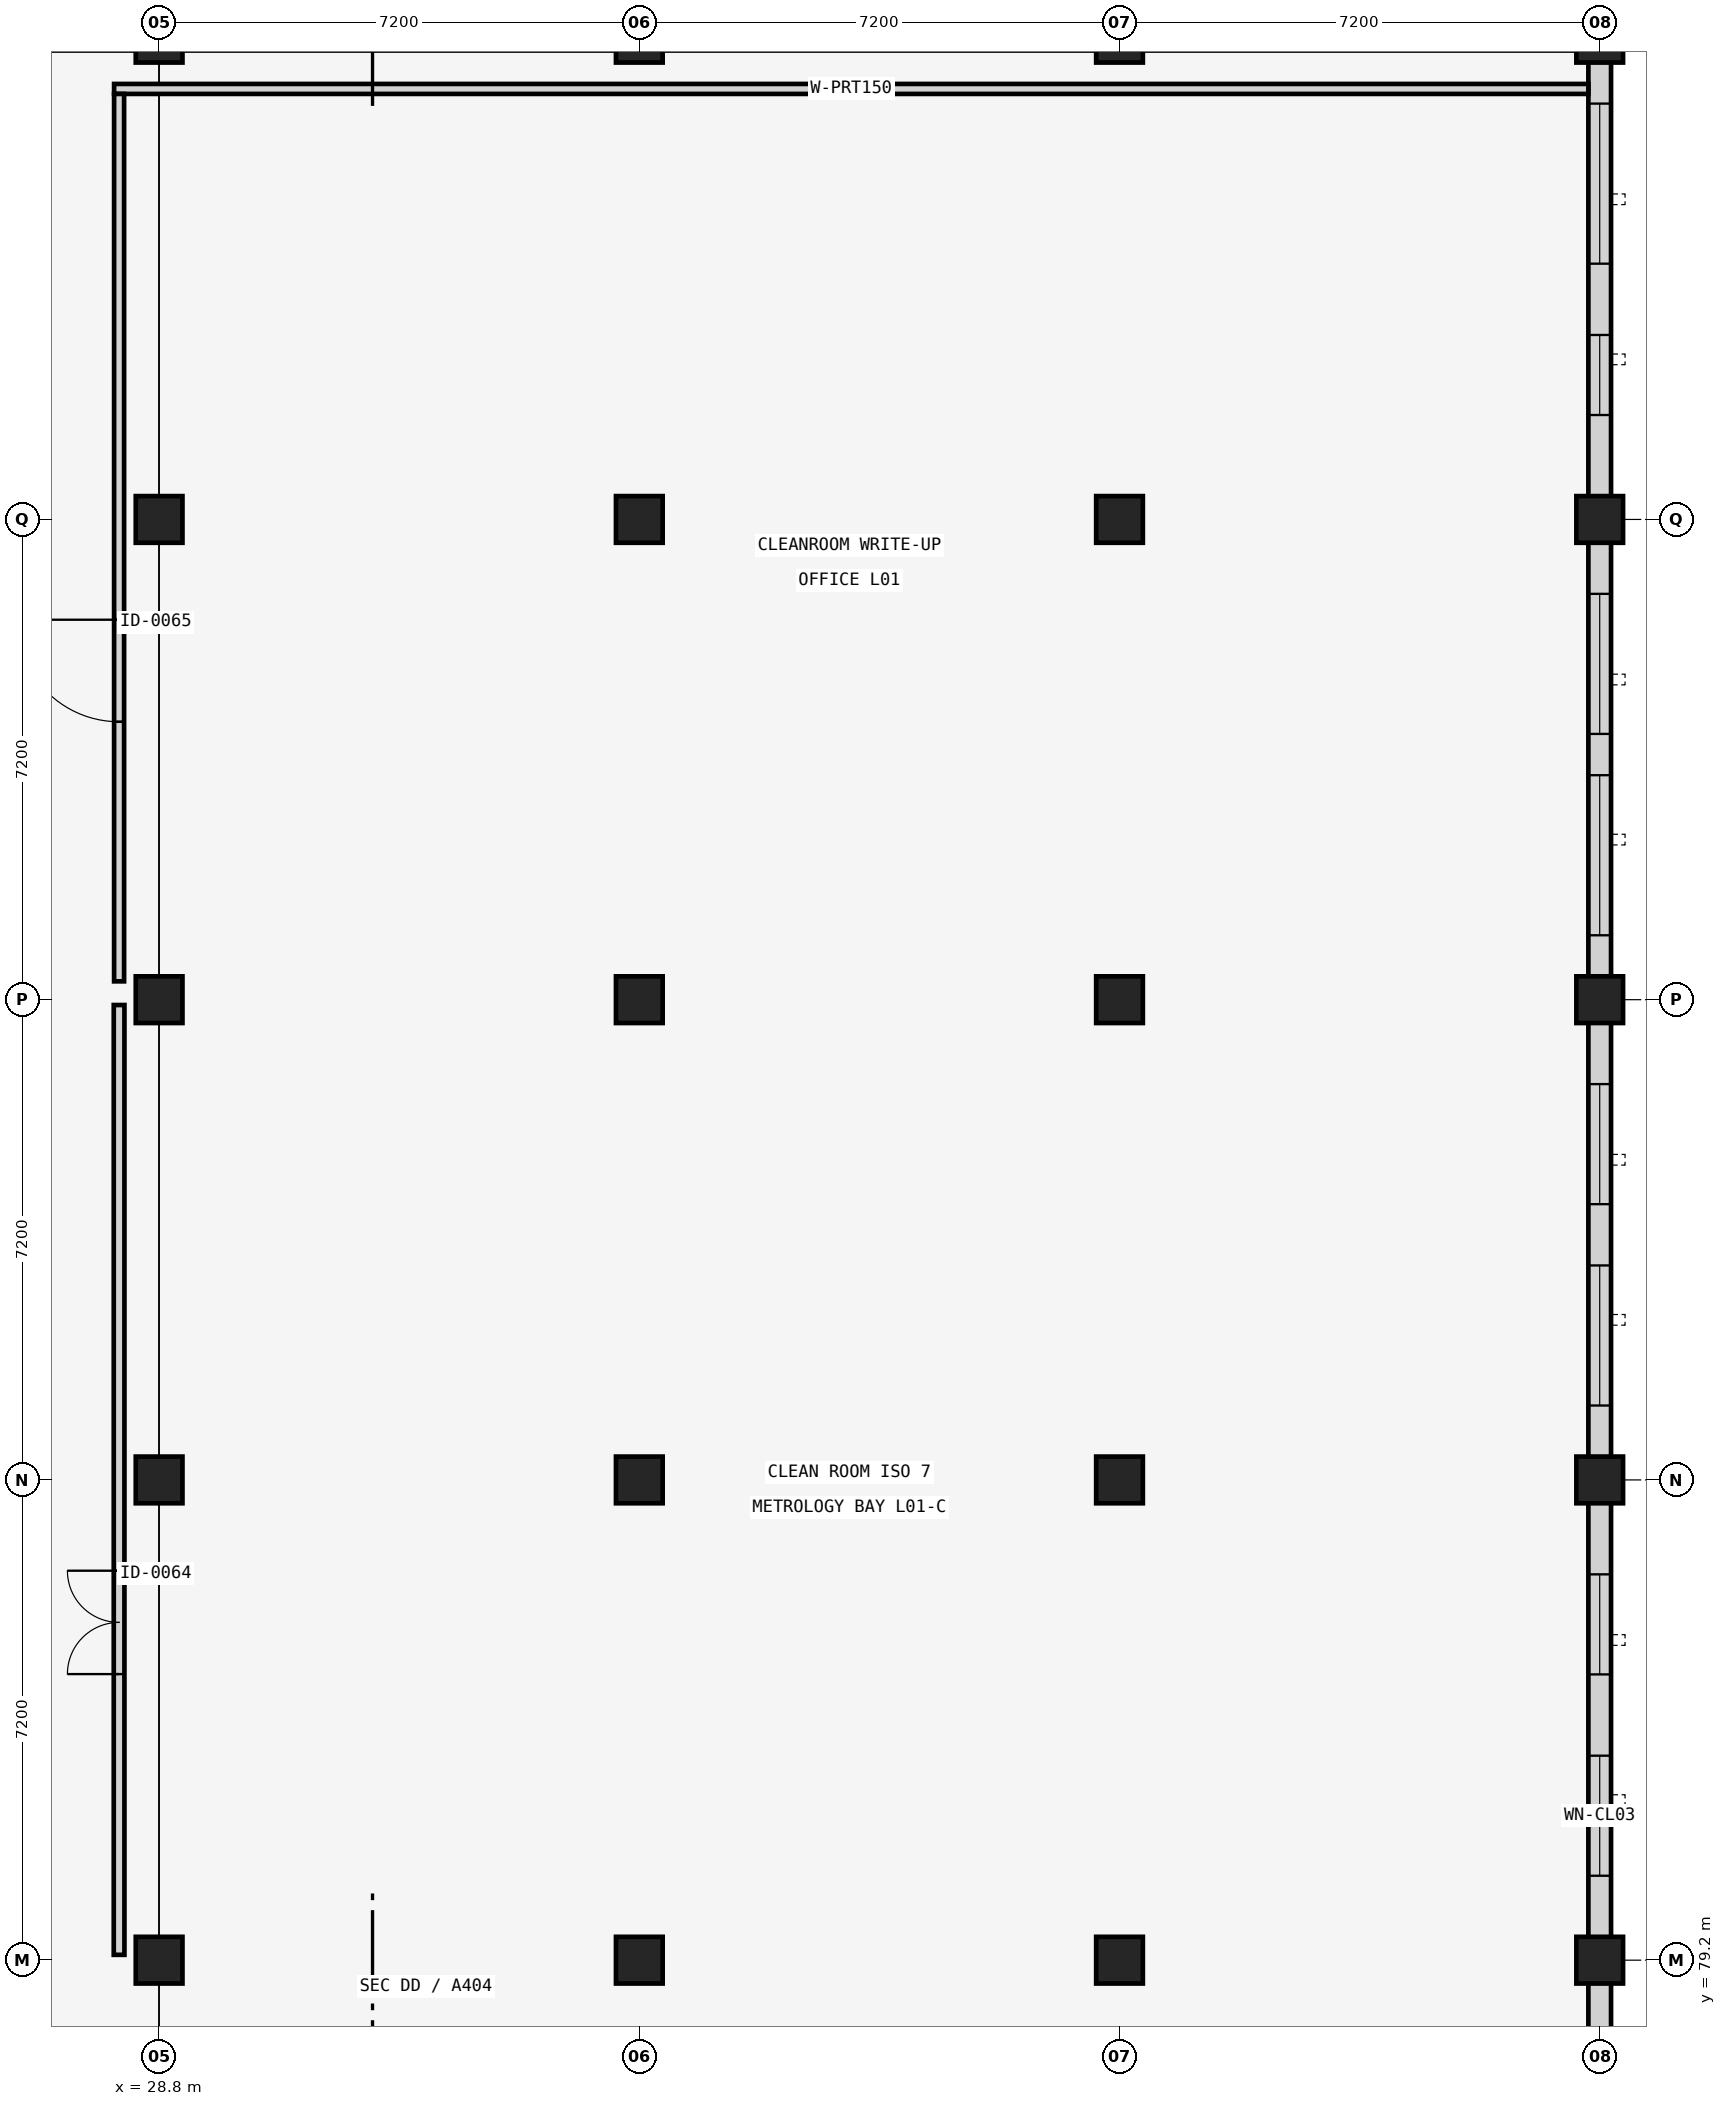
"""IFC4 building model, lengths in metres.
Left out: names, types, materials, properties, quantities, classifications, styles, units other than length and angle.
Written with IfcOpenShell. Run it as: python <this file> out.ifc"""

import sys

from ifc_helpers import new_model, si_unit, direction, frame, frame_2d, origin, origin_2d, place, context, subcontext, project, spatial, rectangle, extrude, element, fill, save


model = new_model("IFC4")
c1 = context("Model", 3, precision=1e-05, world=origin(), true_north=direction((0.0, 1.0)))
c2 = subcontext(c1, "Body", "Model", "MODEL_VIEW")
j1 = project(units=[si_unit("LENGTHUNIT", "METRE"), si_unit("PLANEANGLEUNIT", "RADIAN")], contexts=[c1])
p1 = place(None, origin())
s1 = spatial("IfcSite", under=j1, at=p1, CompositionType="ELEMENT")
p2 = place(p1, origin())
s2 = spatial("IfcBuilding", under=s1, at=p2, CompositionType="ELEMENT")
p3 = place(p2, frame((0.0, 0.0, 4.8)))
s3 = spatial("IfcBuildingStorey", under=s2, at=p3, CompositionType="ELEMENT", Elevation=4.8)
for number, where, z_axis, x_axis in (
    (1, (28.8, 79.2, 0.0), (0.0, 0.0, 1.0), (1.0, 0.0, 0.0)),
    (2, (28.8, 86.4, 0.0), (0.0, 0.0, 1.0), (1.0, 0.0, 0.0)),
    (3, (28.8, 93.6, 0.0), (0.0, 0.0, 1.0), (1.0, 0.0, 0.0)),
    (4, (28.8, 100.8, 0.0), (0.0, 0.0, 1.0), (1.0, 0.0, 0.0)),
    (5, (28.8, 108.0, 0.0), (0.0, 0.0, 1.0), (1.0, 0.0, 0.0)),
    (6, (36.0, 79.2, 0.0), (0.0, 0.0, 1.0), (1.0, 0.0, 0.0)),
    (7, (36.0, 86.4, 0.0), (0.0, 0.0, 1.0), (1.0, 0.0, 0.0)),
    (8, (36.0, 93.6, 0.0), (0.0, 0.0, 1.0), (1.0, 0.0, 0.0)),
    (9, (36.0, 100.8, 0.0), (0.0, 0.0, 1.0), (1.0, 0.0, 0.0)),
    (10, (36.0, 108.0, 0.0), (0.0, 0.0, 1.0), (1.0, 0.0, 0.0)),
    (11, (43.2, 79.2, 0.0), (0.0, 0.0, 1.0), (1.0, 0.0, 0.0)),
    (12, (43.2, 86.4, 0.0), (0.0, 0.0, 1.0), (1.0, 0.0, 0.0)),
    (13, (43.2, 93.6, 0.0), (0.0, 0.0, 1.0), (1.0, 0.0, 0.0)),
    (14, (43.2, 100.8, 0.0), (0.0, 0.0, 1.0), (1.0, 0.0, 0.0)),
    (15, (43.2, 108.0, 0.0), (0.0, 0.0, 1.0), (1.0, 0.0, 0.0)),
    (16, (50.4, 79.2, 0.0), (0.0, 0.0, 1.0), (1.0, 0.0, 0.0)),
    (17, (50.4, 86.4, 0.0), (0.0, 0.0, 1.0), (1.0, 0.0, 0.0)),
    (18, (50.4, 93.6, 0.0), (0.0, 0.0, 1.0), (1.0, 0.0, 0.0)),
    (19, (50.4, 100.8, 0.0), (0.0, 0.0, 1.0), (1.0, 0.0, 0.0)),
    (20, (50.4, 108.0, 0.0), (0.0, 0.0, 1.0), (1.0, 0.0, 0.0)),
):
    element("IfcColumn", number, at=place(p3, frame(where, z_axis=z_axis, x_axis=x_axis)), inside=s3, PredefinedType="COLUMN", context=c2, shape_type="SweptSolid", body=[
        extrude(rectangle(XDim=0.7, YDim=0.7, at=origin_2d()), origin(), (0.0, 0.0, 1.0), 4.16),
    ])
p4 = place(p3, frame((50.4, 72.34, 0.0), z_axis=(0.0, 0.0, 1.0), x_axis=(0.0, 1.0, 0.0)))
e21 = element("IfcWall", 21, at=p4, inside=s3, PredefinedType="SOLIDWALL", context=c2, shape_type="SweptSolid", body=[
    extrude(rectangle(XDim=6.52, YDim=0.34, at=frame_2d((3.26, 0.0))), origin(), (0.0, 0.0, 1.0), 3.11),
])
p5 = place(p4, frame((1.076, 0.0, 1.0)))
e22 = element("IfcOpeningElement", 22, at=p5, cuts=e21, PredefinedType="OPENING", context=c2, shape_type="SweptSolid", body=[
    extrude(rectangle(XDim=1.5, YDim=1.5, at=frame_2d((0.75, 0.75))), frame((0.0, 0.18, 0.0), z_axis=(0.0, -1.0, 0.0), x_axis=(1.0, 0.0, 0.0)), (0.0, 0.0, 1.0), 0.36),
])
p6 = place(p4, frame((4.094, 0.0, 1.0)))
e23 = element("IfcOpeningElement", 23, at=p6, cuts=e21, PredefinedType="OPENING", context=c2, shape_type="SweptSolid", body=[
    extrude(rectangle(XDim=1.2, YDim=1.65, at=frame_2d((0.6, 0.825))), frame((0.0, 0.18, 0.0), z_axis=(0.0, -1.0, 0.0), x_axis=(1.0, 0.0, 0.0)), (0.0, 0.0, 1.0), 0.36),
])
p7 = place(p3, frame((50.4, 79.54, 0.0), z_axis=(0.0, 0.0, 1.0), x_axis=(0.0, 1.0, 0.0)))
e24 = element("IfcWall", 24, at=p7, inside=s3, PredefinedType="SOLIDWALL", context=c2, shape_type="SweptSolid", body=[
    extrude(rectangle(XDim=6.52, YDim=0.34, at=frame_2d((3.26, 0.0))), origin(), (0.0, 0.0, 1.0), 3.11),
])
p8 = place(p7, frame((0.926, 0.0, 1.0)))
e25 = element("IfcOpeningElement", 25, at=p8, cuts=e24, PredefinedType="OPENING", context=c2, shape_type="SweptSolid", body=[
    extrude(rectangle(XDim=1.8, YDim=1.5, at=frame_2d((0.9, 0.75))), frame((0.0, 0.18, 0.0), z_axis=(0.0, -1.0, 0.0), x_axis=(1.0, 0.0, 0.0)), (0.0, 0.0, 1.0), 0.36),
])
p9 = place(p7, frame((3.944, 0.0, 1.0)))
e26 = element("IfcOpeningElement", 26, at=p9, cuts=e24, PredefinedType="OPENING", context=c2, shape_type="SweptSolid", body=[
    extrude(rectangle(XDim=1.5, YDim=1.65, at=frame_2d((0.75, 0.825))), frame((0.0, 0.18, 0.0), z_axis=(0.0, -1.0, 0.0), x_axis=(1.0, 0.0, 0.0)), (0.0, 0.0, 1.0), 0.36),
])
p10 = place(p3, frame((50.4, 86.74, 0.0), z_axis=(0.0, 0.0, 1.0), x_axis=(0.0, 1.0, 0.0)))
e27 = element("IfcWall", 27, at=p10, inside=s3, PredefinedType="SOLIDWALL", context=c2, shape_type="SweptSolid", body=[
    extrude(rectangle(XDim=6.52, YDim=0.34, at=frame_2d((3.26, 0.0))), origin(), (0.0, 0.0, 1.0), 3.11),
])
p11 = place(p10, frame((0.776, 0.0, 1.0)))
e28 = element("IfcOpeningElement", 28, at=p11, cuts=e27, PredefinedType="OPENING", context=c2, shape_type="SweptSolid", body=[
    extrude(rectangle(XDim=2.1, YDim=1.5, at=frame_2d((1.05, 0.75))), frame((0.0, 0.18, 0.0), z_axis=(0.0, -1.0, 0.0), x_axis=(1.0, 0.0, 0.0)), (0.0, 0.0, 1.0), 0.36),
])
p12 = place(p10, frame((3.794, 0.0, 1.0)))
e29 = element("IfcOpeningElement", 29, at=p12, cuts=e27, PredefinedType="OPENING", context=c2, shape_type="SweptSolid", body=[
    extrude(rectangle(XDim=1.8, YDim=1.65, at=frame_2d((0.9, 0.825))), frame((0.0, 0.18, 0.0), z_axis=(0.0, -1.0, 0.0), x_axis=(1.0, 0.0, 0.0)), (0.0, 0.0, 1.0), 0.36),
])
p13 = place(p3, frame((50.4, 93.94, 0.0), z_axis=(0.0, 0.0, 1.0), x_axis=(0.0, 1.0, 0.0)))
e30 = element("IfcWall", 30, at=p13, inside=s3, PredefinedType="SOLIDWALL", context=c2, shape_type="SweptSolid", body=[
    extrude(rectangle(XDim=6.52, YDim=0.34, at=frame_2d((3.26, 0.0))), origin(), (0.0, 0.0, 1.0), 3.11),
])
p14 = place(p13, frame((0.625, 0.0, 1.0)))
e31 = element("IfcOpeningElement", 31, at=p14, cuts=e30, PredefinedType="OPENING", context=c2, shape_type="SweptSolid", body=[
    extrude(rectangle(XDim=2.4, YDim=1.5, at=frame_2d((1.2, 0.75))), frame((0.0, 0.18, 0.0), z_axis=(0.0, -1.0, 0.0), x_axis=(1.0, 0.0, 0.0)), (0.0, 0.0, 1.0), 0.36),
])
p15 = place(p13, frame((3.644, 0.0, 1.0)))
e32 = element("IfcOpeningElement", 32, at=p15, cuts=e30, PredefinedType="OPENING", context=c2, shape_type="SweptSolid", body=[
    extrude(rectangle(XDim=2.1, YDim=1.65, at=frame_2d((1.05, 0.825))), frame((0.0, 0.18, 0.0), z_axis=(0.0, -1.0, 0.0), x_axis=(1.0, 0.0, 0.0)), (0.0, 0.0, 1.0), 0.36),
])
p16 = place(p3, frame((50.4, 101.14, 0.0), z_axis=(0.0, 0.0, 1.0), x_axis=(0.0, 1.0, 0.0)))
e33 = element("IfcWall", 33, at=p16, inside=s3, PredefinedType="SOLIDWALL", context=c2, shape_type="SweptSolid", body=[
    extrude(rectangle(XDim=6.52, YDim=0.34, at=frame_2d((3.26, 0.0))), origin(), (0.0, 0.0, 1.0), 3.11),
])
p17 = place(p16, frame((1.226, 0.0, 1.0)))
e34 = element("IfcOpeningElement", 34, at=p17, cuts=e33, PredefinedType="OPENING", context=c2, shape_type="SweptSolid", body=[
    extrude(rectangle(XDim=1.2, YDim=1.65, at=frame_2d((0.6, 0.825))), frame((0.0, 0.18, 0.0), z_axis=(0.0, -1.0, 0.0), x_axis=(1.0, 0.0, 0.0)), (0.0, 0.0, 1.0), 0.36),
])
p18 = place(p16, frame((3.494, 0.0, 1.0)))
e35 = element("IfcOpeningElement", 35, at=p18, cuts=e33, PredefinedType="OPENING", context=c2, shape_type="SweptSolid", body=[
    extrude(rectangle(XDim=2.4, YDim=1.65, at=frame_2d((1.2, 0.825))), frame((0.0, 0.18, 0.0), z_axis=(0.0, -1.0, 0.0), x_axis=(1.0, 0.0, 0.0)), (0.0, 0.0, 1.0), 0.36),
])
p19 = place(p3, frame((28.2, 79.28, 0.0), z_axis=(0.0, 0.0, 1.0), x_axis=(0.0, 1.0, 0.0)))
e36 = element("IfcWall", 36, at=p19, inside=s3, PredefinedType="PARTITIONING", context=c2, shape_type="SweptSolid", body=[
    extrude(rectangle(XDim=14.24, YDim=0.16, at=frame_2d((7.12, 0.0))), origin(), (0.0, 0.0, 1.0), 3.11),
])
p20 = place(p19, frame((4.209, 0.0, 0.0)))
e37 = element("IfcOpeningElement", 37, at=p20, cuts=e36, PredefinedType="OPENING", context=c2, shape_type="SweptSolid", body=[
    extrude(rectangle(XDim=1.55, YDim=2.25, at=frame_2d((0.775, 1.125))), frame((0.0, 0.09, 0.0), z_axis=(0.0, -1.0, 0.0), x_axis=(1.0, 0.0, 0.0)), (0.0, 0.0, 1.0), 0.18),
])
p21 = place(p3, frame((28.125, 107.254, 0.0), z_axis=(0.0, 0.0, 1.0), x_axis=(1.0, 0.0, 0.0)))
e38 = element("IfcWall", 38, at=p21, inside=s3, PredefinedType="PARTITIONING", context=c2, shape_type="SweptSolid", body=[
    extrude(rectangle(XDim=22.105, YDim=0.15, at=frame_2d((11.052, 0.0))), origin(), (0.0, 0.0, 1.0), 3.21),
])
p22 = place(p3, frame((28.2, 93.875, 0.0), z_axis=(0.0, 0.0, 1.0), x_axis=(0.0, 1.0, 0.0)))
e39 = element("IfcWall", 39, at=p22, inside=s3, PredefinedType="PARTITIONING", context=c2, shape_type="SweptSolid", body=[
    extrude(rectangle(XDim=13.304, YDim=0.15, at=frame_2d((6.652, 0.0))), origin(), (0.0, 0.0, 1.0), 3.11),
])
p23 = place(p22, frame((3.892, 0.0, 0.0)))
e40 = element("IfcOpeningElement", 40, at=p23, cuts=e39, PredefinedType="OPENING", context=c2, shape_type="SweptSolid", body=[
    extrude(rectangle(XDim=1.53, YDim=2.18, at=frame_2d((0.765, 1.09))), frame((0.0, 0.085, 0.0), z_axis=(0.0, -1.0, 0.0), x_axis=(1.0, 0.0, 0.0)), (0.0, 0.0, 1.0), 0.17),
])
p24 = place(p8, origin())
e41 = element("IfcWindow", 41, at=p24, inside=s3, PartitioningType="SINGLE_PANEL", PredefinedType="WINDOW", context=c2, shape_type="SweptSolid", body=[
    extrude(rectangle(XDim=1.8, YDim=1.5, at=frame_2d((0.9, 0.75))), frame((0.0, 0.03, 0.0), z_axis=(0.0, -1.0, 0.0), x_axis=(1.0, 0.0, 0.0)), (0.0, 0.0, 1.0), 0.06),
])
fill(e25, e41)
p25 = place(p9, origin())
e42 = element("IfcWindow", 42, at=p25, inside=s3, PartitioningType="SINGLE_PANEL", PredefinedType="WINDOW", context=c2, shape_type="SweptSolid", body=[
    extrude(rectangle(XDim=1.5, YDim=1.65, at=frame_2d((0.75, 0.825))), frame((0.0, 0.03, 0.0), z_axis=(0.0, -1.0, 0.0), x_axis=(1.0, 0.0, 0.0)), (0.0, 0.0, 1.0), 0.06),
])
fill(e26, e42)
p26 = place(p11, origin())
e43 = element("IfcWindow", 43, at=p26, inside=s3, PartitioningType="SINGLE_PANEL", PredefinedType="WINDOW", context=c2, shape_type="SweptSolid", body=[
    extrude(rectangle(XDim=2.1, YDim=1.5, at=frame_2d((1.05, 0.75))), frame((0.0, 0.03, 0.0), z_axis=(0.0, -1.0, 0.0), x_axis=(1.0, 0.0, 0.0)), (0.0, 0.0, 1.0), 0.06),
])
fill(e28, e43)
p27 = place(p12, origin())
e44 = element("IfcWindow", 44, at=p27, inside=s3, PartitioningType="SINGLE_PANEL", PredefinedType="WINDOW", context=c2, shape_type="SweptSolid", body=[
    extrude(rectangle(XDim=1.8, YDim=1.65, at=frame_2d((0.9, 0.825))), frame((0.0, 0.03, 0.0), z_axis=(0.0, -1.0, 0.0), x_axis=(1.0, 0.0, 0.0)), (0.0, 0.0, 1.0), 0.06),
])
fill(e29, e44)
p28 = place(p14, origin())
e45 = element("IfcWindow", 45, at=p28, inside=s3, PartitioningType="SINGLE_PANEL", PredefinedType="WINDOW", context=c2, shape_type="SweptSolid", body=[
    extrude(rectangle(XDim=2.4, YDim=1.5, at=frame_2d((1.2, 0.75))), frame((0.0, 0.03, 0.0), z_axis=(0.0, -1.0, 0.0), x_axis=(1.0, 0.0, 0.0)), (0.0, 0.0, 1.0), 0.06),
])
fill(e31, e45)
p29 = place(p15, origin())
e46 = element("IfcWindow", 46, at=p29, inside=s3, PartitioningType="SINGLE_PANEL", PredefinedType="WINDOW", context=c2, shape_type="SweptSolid", body=[
    extrude(rectangle(XDim=2.1, YDim=1.65, at=frame_2d((1.05, 0.825))), frame((0.0, 0.03, 0.0), z_axis=(0.0, -1.0, 0.0), x_axis=(1.0, 0.0, 0.0)), (0.0, 0.0, 1.0), 0.06),
])
fill(e32, e46)
p30 = place(p17, origin())
e47 = element("IfcWindow", 47, at=p30, inside=s3, PartitioningType="SINGLE_PANEL", PredefinedType="WINDOW", context=c2, shape_type="SweptSolid", body=[
    extrude(rectangle(XDim=1.2, YDim=1.65, at=frame_2d((0.6, 0.825))), frame((0.0, 0.03, 0.0), z_axis=(0.0, -1.0, 0.0), x_axis=(1.0, 0.0, 0.0)), (0.0, 0.0, 1.0), 0.06),
])
fill(e34, e47)
p31 = place(p18, origin())
e48 = element("IfcWindow", 48, at=p31, inside=s3, PartitioningType="SINGLE_PANEL", PredefinedType="WINDOW", context=c2, shape_type="SweptSolid", body=[
    extrude(rectangle(XDim=2.4, YDim=1.65, at=frame_2d((1.2, 0.825))), frame((0.0, 0.03, 0.0), z_axis=(0.0, -1.0, 0.0), x_axis=(1.0, 0.0, 0.0)), (0.0, 0.0, 1.0), 0.06),
])
fill(e35, e48)
p32 = place(p20, origin())
e49 = element("IfcDoor", 49, at=p32, inside=s3, OperationType="DOUBLE_DOOR_SINGLE_SWING", PredefinedType="DOOR", context=c2, shape_type="SweptSolid", body=[
    extrude(rectangle(XDim=1.55, YDim=2.25, at=frame_2d((0.775, 1.125))), frame((0.0, 0.025, 0.0), z_axis=(0.0, -1.0, 0.0), x_axis=(1.0, 0.0, 0.0)), (0.0, 0.0, 1.0), 0.05),
])
fill(e37, e49)
p33 = place(p23, origin())
e50 = element("IfcDoor", 50, at=p33, inside=s3, OperationType="SINGLE_SWING_RIGHT", PredefinedType="DOOR", context=c2, shape_type="SweptSolid", body=[
    extrude(rectangle(XDim=1.53, YDim=2.18, at=frame_2d((0.765, 1.09))), frame((0.0, 0.025, 0.0), z_axis=(0.0, -1.0, 0.0), x_axis=(1.0, 0.0, 0.0)), (0.0, 0.0, 1.0), 0.05),
])
fill(e40, e50)
save(model, sys.argv[1])
